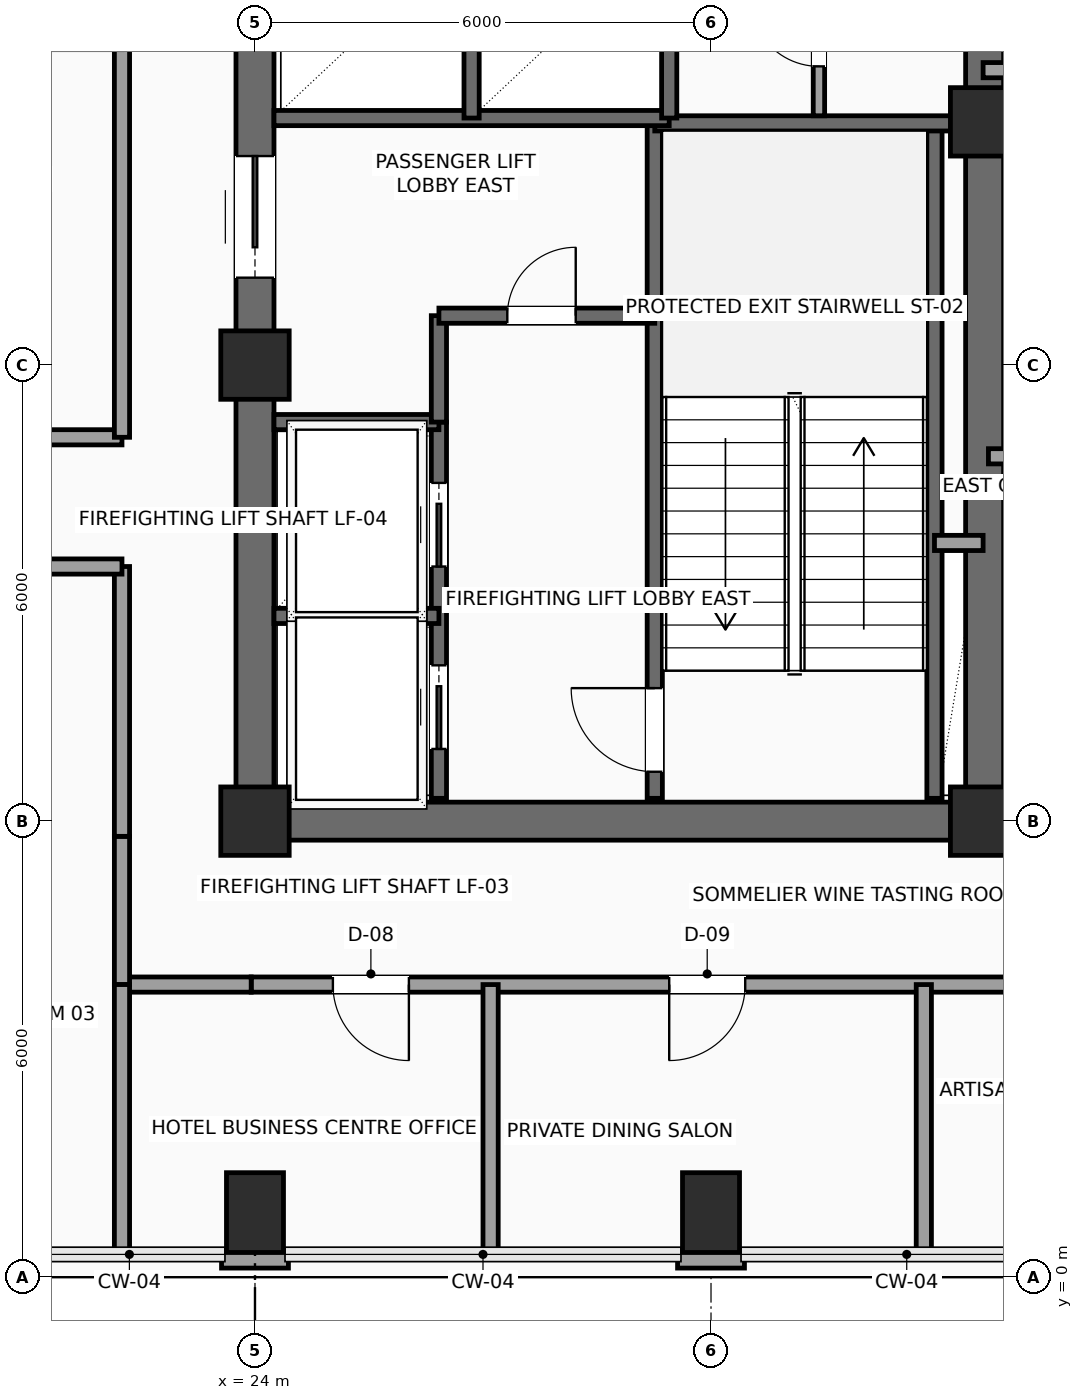
"""IFC4 building model, lengths in metres.
Left out: names, types, materials, properties, quantities, classifications, styles, units other than length and angle.
Written with IfcOpenShell. Run it as: python <this file> out.ifc"""

import sys

from ifc_helpers import new_model, si_unit, direction, frame, frame_2d, origin, origin_2d, place, context, subcontext, project, spatial, rectangle, extrude, element, fill, save


model = new_model("IFC4")
c1 = context("Model", 3, precision=1e-05, world=origin(), true_north=direction((0.0, 1.0)))
c2 = subcontext(c1, "Body", "Model", "MODEL_VIEW")
j1 = project(units=[si_unit("LENGTHUNIT", "METRE"), si_unit("PLANEANGLEUNIT", "RADIAN")], contexts=[c1])
p1 = place(None, origin())
s1 = spatial("IfcSite", under=j1, at=p1, CompositionType="ELEMENT")
p2 = place(p1, origin())
s2 = spatial("IfcBuilding", under=s1, at=p2, CompositionType="ELEMENT")
p3 = place(p2, frame((0.0, 0.0, 176.7)))
s3 = spatial("IfcBuildingStorey", under=s2, at=p3, CompositionType="ELEMENT", Elevation=176.7)
for number, where, z_axis, x_axis in (
    (1, (24.0, 6.0, 0.0), (0.0, 0.0, 1.0), (1.0, 0.0, 0.0)),
    (2, (24.0, 12.0, 0.0), (0.0, 0.0, 1.0), (1.0, 0.0, 0.0)),
    (3, (33.6, 6.0, 0.0), (0.0, 0.0, 1.0), (1.0, 0.0, 0.0)),
    (4, (33.6, 15.2, 0.0), (0.0, 0.0, 1.0), (1.0, 0.0, 0.0)),
):
    element("IfcColumn", number, at=place(p3, frame(where, z_axis=z_axis, x_axis=x_axis)), inside=s3, PredefinedType="COLUMN", context=c2, shape_type="SweptSolid", body=[
        extrude(rectangle(XDim=0.9, YDim=0.9, at=origin_2d()), origin(), (0.0, 0.0, 1.0), 3.75),
    ])
for number, where, z_axis, x_axis in (
    (5, (24.0, 0.85, 0.0), (0.0, 0.0, 1.0), (1.0, 0.0, 0.0)),
    (6, (30.0, 0.85, 0.0), (0.0, 0.0, 1.0), (1.0, 0.0, 0.0)),
):
    element("IfcColumn", number, at=place(p3, frame(where, z_axis=z_axis, x_axis=x_axis)), inside=s3, PredefinedType="COLUMN", context=c2, shape_type="SweptSolid", body=[
        extrude(rectangle(XDim=0.75, YDim=1.05, at=origin_2d()), origin(), (0.0, 0.0, 1.0), 3.75),
    ])
for number, where, z_axis, x_axis in (
    (7, (30.44, 0.24, 0.0), (0.0, 0.0, 1.0), (-1.0, 0.0, 0.0)),
    (8, (24.44, 0.24, 0.0), (0.0, 0.0, 1.0), (-1.0, 0.0, 0.0)),
):
    element("IfcWall", number, at=place(p3, frame(where, z_axis=z_axis, x_axis=x_axis)), inside=s3, PredefinedType="SOLIDWALL", context=c2, shape_type="SweptSolid", body=[
        extrude(rectangle(XDim=0.88, YDim=0.24, at=frame_2d((0.44, 0.0))), origin(), (0.0, 0.0, 1.0), 3.54),
    ])
p4 = place(p3, frame((24.0, 6.0, 0.0), z_axis=(0.0, 0.0, 1.0), x_axis=(1.0, 0.0, 0.0)))
e9 = element("IfcWall", 9, at=p4, inside=s3, PredefinedType="SHEAR", context=c2, shape_type="SweptSolid", body=[
    extrude(rectangle(XDim=9.6, YDim=0.5, at=frame_2d((4.8, 0.0))), origin(), (0.0, 0.0, 1.0), 3.54),
])
p5 = place(p3, frame((24.0, 6.0, 0.0), z_axis=(0.0, 0.0, 1.0), x_axis=(0.0, 1.0, 0.0)))
e10 = element("IfcWall", 10, at=p5, inside=s3, PredefinedType="SHEAR", context=c2, shape_type="SweptSolid", body=[
    extrude(rectangle(XDim=12.0, YDim=0.5, at=frame_2d((6.0, 0.0))), origin(), (0.0, 0.0, 1.0), 3.54),
])
p6 = place(p5, frame((7.15, 0.0, 0.0)))
e11 = element("IfcOpeningElement", 11, at=p6, cuts=e10, PredefinedType="OPENING", context=c2, shape_type="SweptSolid", body=[
    extrude(rectangle(XDim=1.6, YDim=2.3, at=frame_2d((0.8, 1.15))), frame((0.0, 0.26, 0.0), z_axis=(0.0, -1.0, 0.0), x_axis=(1.0, 0.0, 0.0)), (0.0, 0.0, 1.0), 0.52),
])
p7 = place(p3, frame((33.6, 6.0, 0.0), z_axis=(0.0, 0.0, 1.0), x_axis=(0.0, 1.0, 0.0)))
e12 = element("IfcWall", 12, at=p7, inside=s3, PredefinedType="SHEAR", context=c2, shape_type="SweptSolid", body=[
    extrude(rectangle(XDim=12.0, YDim=0.5, at=frame_2d((6.0, 0.0))), origin(), (0.0, 0.0, 1.0), 3.54),
])
p8 = place(p7, frame((10.15, 0.0, 0.0)))
e13 = element("IfcOpeningElement", 13, at=p8, cuts=e12, PredefinedType="OPENING", context=c2, shape_type="SweptSolid", body=[
    extrude(rectangle(XDim=0.9, YDim=2.15, at=frame_2d((0.45, 1.075))), frame((0.0, 0.26, 0.0), z_axis=(0.0, -1.0, 0.0), x_axis=(1.0, 0.0, 0.0)), (0.0, 0.0, 1.0), 0.52),
])
p9 = place(p3, frame((29.26, 6.3, 0.0), z_axis=(0.0, 0.0, 1.0), x_axis=(0.0, 1.0, 0.0)))
e14 = element("IfcWall", 14, at=p9, inside=s3, PredefinedType="SHEAR", context=c2, shape_type="SweptSolid", body=[
    extrude(rectangle(XDim=8.88, YDim=0.2, at=frame_2d((4.44, 0.0))), origin(), (0.0, 0.0, 1.0), 3.54),
])
p10 = place(p9, frame((0.35, 0.0, 0.0)))
e15 = element("IfcOpeningElement", 15, at=p10, cuts=e14, PredefinedType="OPENING", context=c2, shape_type="SweptSolid", body=[
    extrude(rectangle(XDim=1.1, YDim=2.2, at=frame_2d((0.55, 1.1))), frame((0.0, 0.11, 0.0), z_axis=(0.0, -1.0, 0.0), x_axis=(1.0, 0.0, 0.0)), (0.0, 0.0, 1.0), 0.22),
])
p11 = place(p3, frame((32.94, 6.3, 0.0), z_axis=(0.0, 0.0, 1.0), x_axis=(0.0, 1.0, 0.0)))
e16 = element("IfcWall", 16, at=p11, inside=s3, PredefinedType="SHEAR", context=c2, shape_type="SweptSolid", body=[
    extrude(rectangle(XDim=8.88, YDim=0.2, at=frame_2d((4.44, 0.0))), origin(), (0.0, 0.0, 1.0), 3.54),
])
p12 = place(p3, frame((29.26, 15.18, 0.0), z_axis=(0.0, 0.0, 1.0), x_axis=(1.0, 0.0, 0.0)))
e17 = element("IfcWall", 17, at=p12, inside=s3, PredefinedType="SHEAR", context=c2, shape_type="SweptSolid", body=[
    extrude(rectangle(XDim=4.04, YDim=0.2, at=frame_2d((2.02, 0.0))), origin(), (0.0, 0.0, 1.0), 3.54),
])
p13 = place(p3, frame((26.42, 6.3, 0.0), z_axis=(0.0, 0.0, 1.0), x_axis=(0.0, 1.0, 0.0)))
e18 = element("IfcWall", 18, at=p13, inside=s3, PredefinedType="SHEAR", context=c2, shape_type="SweptSolid", body=[
    extrude(rectangle(XDim=4.95, YDim=0.2, at=frame_2d((2.475, 0.0))), origin(), (0.0, 0.0, 1.0), 3.54),
])
p14 = place(p13, frame((0.65, 0.0, 0.0)))
e19 = element("IfcOpeningElement", 19, at=p14, cuts=e18, PredefinedType="OPENING", context=c2, shape_type="SweptSolid", body=[
    extrude(rectangle(XDim=1.1, YDim=2.2, at=frame_2d((0.55, 1.1))), frame((0.0, 0.11, 0.0), z_axis=(0.0, -1.0, 0.0), x_axis=(1.0, 0.0, 0.0)), (0.0, 0.0, 1.0), 0.22),
])
p15 = place(p13, frame((3.05, 0.0, 0.0)))
e20 = element("IfcOpeningElement", 20, at=p15, cuts=e18, PredefinedType="OPENING", context=c2, shape_type="SweptSolid", body=[
    extrude(rectangle(XDim=1.1, YDim=2.2, at=frame_2d((0.55, 1.1))), frame((0.0, 0.11, 0.0), z_axis=(0.0, -1.0, 0.0), x_axis=(1.0, 0.0, 0.0)), (0.0, 0.0, 1.0), 0.22),
])
for number, where, z_axis, x_axis in (
    (21, (24.25, 8.7, 0.0), (0.0, 0.0, 1.0), (1.0, 0.0, 0.0)),
    (22, (24.25, 11.25, 0.0), (0.0, 0.0, 1.0), (1.0, 0.0, 0.0)),
):
    element("IfcWall", number, at=place(p3, frame(where, z_axis=z_axis, x_axis=x_axis)), inside=s3, PredefinedType="SHEAR", context=c2, shape_type="SweptSolid", body=[
        extrude(rectangle(XDim=2.17, YDim=0.2, at=frame_2d((1.085, 0.0))), origin(), (0.0, 0.0, 1.0), 3.54),
    ])
p16 = place(p3, frame((26.42, 11.25, 0.0), z_axis=(0.0, 0.0, 1.0), x_axis=(0.0, 1.0, 0.0)))
e23 = element("IfcWall", 23, at=p16, inside=s3, PredefinedType="SHEAR", context=c2, shape_type="SweptSolid", body=[
    extrude(rectangle(XDim=1.4, YDim=0.2, at=frame_2d((0.7, 0.0))), origin(), (0.0, 0.0, 1.0), 3.54),
])
p17 = place(p3, frame((26.42, 12.65, 0.0), z_axis=(0.0, 0.0, 1.0), x_axis=(1.0, 0.0, 0.0)))
e24 = element("IfcWall", 24, at=p17, inside=s3, PredefinedType="SHEAR", context=c2, shape_type="SweptSolid", body=[
    extrude(rectangle(XDim=2.84, YDim=0.2, at=frame_2d((1.42, 0.0))), origin(), (0.0, 0.0, 1.0), 3.54),
])
p18 = place(p17, frame((0.9, 0.0, 0.0)))
e25 = element("IfcOpeningElement", 25, at=p18, cuts=e24, PredefinedType="OPENING", context=c2, shape_type="SweptSolid", body=[
    extrude(rectangle(XDim=0.9, YDim=2.15, at=frame_2d((0.45, 1.075))), frame((0.0, 0.11, 0.0), z_axis=(0.0, -1.0, 0.0), x_axis=(1.0, 0.0, 0.0)), (0.0, 0.0, 1.0), 0.22),
])
p19 = place(p3, frame((32.94, 9.66, 0.0), z_axis=(0.0, 0.0, 1.0), x_axis=(1.0, 0.0, 0.0)))
e26 = element("IfcWall", 26, at=p19, inside=s3, PredefinedType="SOLIDWALL", context=c2, shape_type="SweptSolid", body=[
    extrude(rectangle(XDim=0.64, YDim=0.2, at=frame_2d((0.32, 0.0))), origin(), (0.0, 0.0, 1.0), 3.54),
])
p20 = place(p3, frame((24.25, 15.25, 0.0), z_axis=(0.0, 0.0, 1.0), x_axis=(1.0, 0.0, 0.0)))
e27 = element("IfcWall", 27, at=p20, inside=s3, PredefinedType="SHEAR", context=c2, shape_type="SweptSolid", body=[
    extrude(rectangle(XDim=5.2, YDim=0.2, at=frame_2d((2.6, 0.0))), origin(), (0.0, 0.0, 1.0), 3.54),
])
p21 = place(p3, frame((26.85, 15.25, 0.0), z_axis=(0.0, 0.0, 1.0), x_axis=(0.0, 1.0, 0.0)))
e28 = element("IfcWall", 28, at=p21, inside=s3, PredefinedType="SHEAR", context=c2, shape_type="SweptSolid", body=[
    extrude(rectangle(XDim=2.4, YDim=0.2, at=frame_2d((1.2, 0.0))), origin(), (0.0, 0.0, 1.0), 3.54),
])
p22 = place(p3, frame((29.45, 15.25, 0.0), z_axis=(0.0, 0.0, 1.0), x_axis=(0.0, 1.0, 0.0)))
e29 = element("IfcWall", 29, at=p22, inside=s3, PredefinedType="SHEAR", context=c2, shape_type="SweptSolid", body=[
    extrude(rectangle(XDim=2.45, YDim=0.2, at=frame_2d((1.225, 0.0))), origin(), (0.0, 0.0, 1.0), 3.54),
])
p23 = place(p3, frame((31.42, 15.28, 0.0), z_axis=(0.0, 0.0, 1.0), x_axis=(0.0, 1.0, 0.0)))
e30 = element("IfcWall", 30, at=p23, inside=s3, PredefinedType="PARTITIONING", context=c2, shape_type="SweptSolid", body=[
    extrude(rectangle(XDim=2.42, YDim=0.15, at=frame_2d((1.21, 0.0))), origin(), (0.0, 0.0, 1.0), 3.54),
])
p24 = place(p23, frame((0.65, 0.0, 0.0)))
e31 = element("IfcOpeningElement", 31, at=p24, cuts=e30, PredefinedType="OPENING", context=c2, shape_type="SweptSolid", body=[
    extrude(rectangle(XDim=0.9, YDim=2.15, at=frame_2d((0.45, 1.075))), frame((0.0, 0.085, 0.0), z_axis=(0.0, -1.0, 0.0), x_axis=(1.0, 0.0, 0.0)), (0.0, 0.0, 1.0), 0.17),
])
p25 = place(p3, frame((36.35, 15.88, 0.0), z_axis=(0.0, 0.0, 1.0), x_axis=(-1.0, 0.0, 0.0)))
e32 = element("IfcWall", 32, at=p25, inside=s3, PredefinedType="PARTITIONING", context=c2, shape_type="SweptSolid", body=[
    extrude(rectangle(XDim=2.77, YDim=0.2, at=frame_2d((1.385, 0.0))), origin(), (0.0, 0.0, 1.0), 3.54),
])
p26 = place(p3, frame((36.35, 3.85, 0.0), z_axis=(0.0, 0.0, 1.0), x_axis=(-1.0, 0.0, 0.0)))
e33 = element("IfcWall", 33, at=p26, inside=s3, PredefinedType="PARTITIONING", context=c2, shape_type="SweptSolid", body=[
    extrude(rectangle(XDim=12.4, YDim=0.2, at=frame_2d((6.2, 0.0))), origin(), (0.0, 0.0, 1.0), 3.54),
])
p27 = place(p26, frame((10.325, 0.0, 0.0)))
e34 = element("IfcOpeningElement", 34, at=p27, cuts=e33, PredefinedType="OPENING", context=c2, shape_type="SweptSolid", body=[
    extrude(rectangle(XDim=1.0, YDim=2.2, at=frame_2d((0.5, 1.1))), frame((0.0, 0.11, 0.0), z_axis=(0.0, -1.0, 0.0), x_axis=(1.0, 0.0, 0.0)), (0.0, 0.0, 1.0), 0.22),
])
p28 = place(p26, frame((5.9, 0.0, 0.0)))
e35 = element("IfcOpeningElement", 35, at=p28, cuts=e33, PredefinedType="OPENING", context=c2, shape_type="SweptSolid", body=[
    extrude(rectangle(XDim=1.0, YDim=2.2, at=frame_2d((0.5, 1.1))), frame((0.0, 0.11, 0.0), z_axis=(0.0, -1.0, 0.0), x_axis=(1.0, 0.0, 0.0)), (0.0, 0.0, 1.0), 0.22),
])
p29 = place(p3, frame((23.95, 3.85, 0.0), z_axis=(0.0, 0.0, 1.0), x_axis=(-1.0, 0.0, 0.0)))
e36 = element("IfcWall", 36, at=p29, inside=s3, PredefinedType="PARTITIONING", context=c2, shape_type="SweptSolid", body=[
    extrude(rectangle(XDim=1.7, YDim=0.2, at=frame_2d((0.85, 0.0))), origin(), (0.0, 0.0, 1.0), 3.54),
])
p30 = place(p3, frame((22.25, 3.85, 0.0), z_axis=(0.0, 0.0, 1.0), x_axis=(0.0, 1.0, 0.0)))
e37 = element("IfcWall", 37, at=p30, inside=s3, PredefinedType="PARTITIONING", context=c2, shape_type="SweptSolid", body=[
    extrude(rectangle(XDim=1.95, YDim=0.2, at=frame_2d((0.975, 0.0))), origin(), (0.0, 0.0, 1.0), 3.54),
])
p31 = place(p3, frame((22.25, 5.8, 0.0), z_axis=(0.0, 0.0, 1.0), x_axis=(0.0, 1.0, 0.0)))
e38 = element("IfcWall", 38, at=p31, inside=s3, PredefinedType="PARTITIONING", context=c2, shape_type="SweptSolid", body=[
    extrude(rectangle(XDim=3.55, YDim=0.2, at=frame_2d((1.775, 0.0))), origin(), (0.0, 0.0, 1.0), 3.54),
])
p32 = place(p3, frame((22.25, 9.35, 0.0), z_axis=(0.0, 0.0, 1.0), x_axis=(-1.0, 0.0, 0.0)))
e39 = element("IfcWall", 39, at=p32, inside=s3, PredefinedType="PARTITIONING", context=c2, shape_type="SweptSolid", body=[
    extrude(rectangle(XDim=15.85, YDim=0.2, at=frame_2d((7.925, 0.0))), origin(), (0.0, 0.0, 1.0), 3.54),
])
p33 = place(p32, frame((14.19, 0.0, 0.0)))
e40 = element("IfcOpeningElement", 40, at=p33, cuts=e39, PredefinedType="OPENING", context=c2, shape_type="SweptSolid", body=[
    extrude(rectangle(XDim=1.0, YDim=2.2, at=frame_2d((0.5, 1.1))), frame((0.0, 0.11, 0.0), z_axis=(0.0, -1.0, 0.0), x_axis=(1.0, 0.0, 0.0)), (0.0, 0.0, 1.0), 0.22),
])
p34 = place(p32, frame((8.265, 0.0, 0.0)))
e41 = element("IfcOpeningElement", 41, at=p34, cuts=e39, PredefinedType="OPENING", context=c2, shape_type="SweptSolid", body=[
    extrude(rectangle(XDim=1.0, YDim=2.2, at=frame_2d((0.5, 1.1))), frame((0.0, 0.11, 0.0), z_axis=(0.0, -1.0, 0.0), x_axis=(1.0, 0.0, 0.0)), (0.0, 0.0, 1.0), 0.22),
])
p35 = place(p32, frame((1.54, 0.0, 0.0)))
e42 = element("IfcOpeningElement", 42, at=p35, cuts=e39, PredefinedType="OPENING", context=c2, shape_type="SweptSolid", body=[
    extrude(rectangle(XDim=1.0, YDim=2.2, at=frame_2d((0.5, 1.1))), frame((0.0, 0.11, 0.0), z_axis=(0.0, -1.0, 0.0), x_axis=(1.0, 0.0, 0.0)), (0.0, 0.0, 1.0), 0.22),
])
p36 = place(p3, frame((10.45, 11.05, 0.0), z_axis=(0.0, 0.0, 1.0), x_axis=(1.0, 0.0, 0.0)))
e43 = element("IfcWall", 43, at=p36, inside=s3, PredefinedType="PARTITIONING", context=c2, shape_type="SweptSolid", body=[
    extrude(rectangle(XDim=11.8, YDim=0.2, at=frame_2d((5.9, 0.0))), origin(), (0.0, 0.0, 1.0), 3.54),
])
p37 = place(p36, frame((2.33, 0.0, 0.0)))
e44 = element("IfcOpeningElement", 44, at=p37, cuts=e43, PredefinedType="OPENING", context=c2, shape_type="SweptSolid", body=[
    extrude(rectangle(XDim=1.0, YDim=2.2, at=frame_2d((0.5, 1.1))), frame((0.0, 0.11, 0.0), z_axis=(0.0, -1.0, 0.0), x_axis=(1.0, 0.0, 0.0)), (0.0, 0.0, 1.0), 0.22),
])
p38 = place(p36, frame((5.3, 0.0, 0.0)))
e45 = element("IfcOpeningElement", 45, at=p38, cuts=e43, PredefinedType="OPENING", context=c2, shape_type="SweptSolid", body=[
    extrude(rectangle(XDim=0.9, YDim=2.1, at=frame_2d((0.45, 1.05))), frame((0.0, 0.11, 0.0), z_axis=(0.0, -1.0, 0.0), x_axis=(1.0, 0.0, 0.0)), (0.0, 0.0, 1.0), 0.22),
])
p39 = place(p36, frame((9.225, 0.0, 0.0)))
e46 = element("IfcOpeningElement", 46, at=p39, cuts=e43, PredefinedType="OPENING", context=c2, shape_type="SweptSolid", body=[
    extrude(rectangle(XDim=0.9, YDim=2.1, at=frame_2d((0.45, 1.05))), frame((0.0, 0.11, 0.0), z_axis=(0.0, -1.0, 0.0), x_axis=(1.0, 0.0, 0.0)), (0.0, 0.0, 1.0), 0.22),
])
p40 = place(p3, frame((22.25, 11.05, 0.0), z_axis=(0.0, 0.0, 1.0), x_axis=(0.0, 1.0, 0.0)))
e47 = element("IfcWall", 47, at=p40, inside=s3, PredefinedType="PARTITIONING", context=c2, shape_type="SweptSolid", body=[
    extrude(rectangle(XDim=19.2, YDim=0.2, at=frame_2d((9.6, 0.0))), origin(), (0.0, 0.0, 1.0), 3.54),
])
for number, where, z_axis, x_axis in (
    (48, (22.25, 0.3, 0.0), (0.0, 0.0, 1.0), (0.0, 1.0, 0.0)),
    (49, (27.1, 0.3, 0.0), (0.0, 0.0, 1.0), (0.0, 1.0, 0.0)),
    (50, (32.8, 0.3, 0.0), (0.0, 0.0, 1.0), (0.0, 1.0, 0.0)),
):
    element("IfcWall", number, at=place(p3, frame(where, z_axis=z_axis, x_axis=x_axis)), inside=s3, PredefinedType="PARTITIONING", context=c2, shape_type="SweptSolid", body=[
        extrude(rectangle(XDim=3.55, YDim=0.2, at=frame_2d((1.775, 0.0))), origin(), (0.0, 0.0, 1.0), 3.54),
    ])
p41 = place(p3, frame((33.65, 5.8, 0.0), z_axis=(0.0, 0.0, 1.0), x_axis=(1.0, 0.0, 0.0)))
e51 = element("IfcWall", 51, at=p41, inside=s3, PredefinedType="PARTITIONING", context=c2, shape_type="SweptSolid", body=[
    extrude(rectangle(XDim=2.7, YDim=0.2, at=frame_2d((1.35, 0.0))), origin(), (0.0, 0.0, 1.0), 3.132),
])
p42 = place(p3, frame((33.65, 10.8, 0.0), z_axis=(0.0, 0.0, 1.0), x_axis=(1.0, 0.0, 0.0)))
e52 = element("IfcWall", 52, at=p42, inside=s3, PredefinedType="PARTITIONING", context=c2, shape_type="SweptSolid", body=[
    extrude(rectangle(XDim=2.7, YDim=0.2, at=frame_2d((1.35, 0.0))), origin(), (0.0, 0.0, 1.0), 3.54),
])
p43 = place(p6, origin())
e53 = element("IfcDoor", 53, at=p43, inside=s3, OperationType="DOUBLE_DOOR_SLIDING", PredefinedType="DOOR", context=c2, shape_type="SweptSolid", body=[
    extrude(rectangle(XDim=1.6, YDim=2.3, at=frame_2d((0.8, 1.15))), frame((0.0, 0.025, 0.0), z_axis=(0.0, -1.0, 0.0), x_axis=(1.0, 0.0, 0.0)), (0.0, 0.0, 1.0), 0.05),
])
fill(e11, e53)
p44 = place(p10, origin())
e54 = element("IfcDoor", 54, at=p44, inside=s3, OperationType="SINGLE_SWING_RIGHT", PredefinedType="DOOR", context=c2, shape_type="SweptSolid", body=[
    extrude(rectangle(XDim=1.1, YDim=2.2, at=frame_2d((0.55, 1.1))), frame((0.0, 0.025, 0.0), z_axis=(0.0, -1.0, 0.0), x_axis=(1.0, 0.0, 0.0)), (0.0, 0.0, 1.0), 0.05),
])
fill(e15, e54)
p45 = place(p14, origin())
e55 = element("IfcDoor", 55, at=p45, inside=s3, OperationType="SLIDING_TO_LEFT", PredefinedType="DOOR", context=c2, shape_type="SweptSolid", body=[
    extrude(rectangle(XDim=1.1, YDim=2.2, at=frame_2d((0.55, 1.1))), frame((0.0, 0.025, 0.0), z_axis=(0.0, -1.0, 0.0), x_axis=(1.0, 0.0, 0.0)), (0.0, 0.0, 1.0), 0.05),
])
fill(e19, e55)
p46 = place(p15, origin())
e56 = element("IfcDoor", 56, at=p46, inside=s3, OperationType="SLIDING_TO_LEFT", PredefinedType="DOOR", context=c2, shape_type="SweptSolid", body=[
    extrude(rectangle(XDim=1.1, YDim=2.2, at=frame_2d((0.55, 1.1))), frame((0.0, 0.025, 0.0), z_axis=(0.0, -1.0, 0.0), x_axis=(1.0, 0.0, 0.0)), (0.0, 0.0, 1.0), 0.05),
])
fill(e20, e56)
p47 = place(p18, origin())
e57 = element("IfcDoor", 57, at=p47, inside=s3, OperationType="SINGLE_SWING_RIGHT", PredefinedType="DOOR", context=c2, shape_type="SweptSolid", body=[
    extrude(rectangle(XDim=0.9, YDim=2.15, at=frame_2d((0.45, 1.075))), frame((0.0, 0.025, 0.0), z_axis=(0.0, -1.0, 0.0), x_axis=(1.0, 0.0, 0.0)), (0.0, 0.0, 1.0), 0.05),
])
fill(e25, e57)
p48 = place(p24, origin())
e58 = element("IfcDoor", 58, at=p48, inside=s3, OperationType="SINGLE_SWING_RIGHT", PredefinedType="DOOR", context=c2, shape_type="SweptSolid", body=[
    extrude(rectangle(XDim=0.9, YDim=2.15, at=frame_2d((0.45, 1.075))), frame((0.0, 0.025, 0.0), z_axis=(0.0, -1.0, 0.0), x_axis=(1.0, 0.0, 0.0)), (0.0, 0.0, 1.0), 0.05),
])
fill(e31, e58)
p49 = place(p27, origin())
e59 = element("IfcDoor", 59, at=p49, inside=s3, OperationType="SINGLE_SWING_LEFT", PredefinedType="DOOR", context=c2, shape_type="SweptSolid", body=[
    extrude(rectangle(XDim=1.0, YDim=2.2, at=frame_2d((0.5, 1.1))), frame((0.0, 0.025, 0.0), z_axis=(0.0, -1.0, 0.0), x_axis=(1.0, 0.0, 0.0)), (0.0, 0.0, 1.0), 0.05),
])
fill(e34, e59)
p50 = place(p28, origin())
e60 = element("IfcDoor", 60, at=p50, inside=s3, OperationType="SINGLE_SWING_RIGHT", PredefinedType="DOOR", context=c2, shape_type="SweptSolid", body=[
    extrude(rectangle(XDim=1.0, YDim=2.2, at=frame_2d((0.5, 1.1))), frame((0.0, 0.025, 0.0), z_axis=(0.0, -1.0, 0.0), x_axis=(1.0, 0.0, 0.0)), (0.0, 0.0, 1.0), 0.05),
])
fill(e35, e60)
save(model, sys.argv[1])
